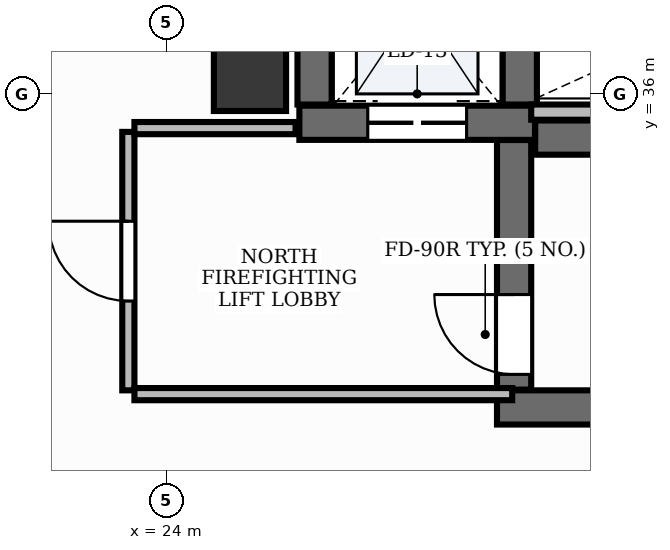
"""IFC4 building model, lengths in metres.
Left out: names, types, materials, properties, quantities, classifications, styles, units other than length and angle.
Written with IfcOpenShell. Run it as: python <this file> out.ifc"""

import sys

from ifc_helpers import new_model, si_unit, direction, frame, frame_2d, origin, origin_2d, place, context, subcontext, project, spatial, rectangle, extrude, element, fill, save


model = new_model("IFC4")
c1 = context("Model", 3, precision=1e-05, world=origin(), true_north=direction((0.0, 1.0)))
c2 = subcontext(c1, "Body", "Model", "MODEL_VIEW")
j1 = project(units=[si_unit("LENGTHUNIT", "METRE"), si_unit("PLANEANGLEUNIT", "RADIAN")], contexts=[c1])
p1 = place(None, origin())
s1 = spatial("IfcSite", under=j1, at=p1, CompositionType="ELEMENT")
p2 = place(p1, origin())
s2 = spatial("IfcBuilding", under=s1, at=p2, CompositionType="ELEMENT")
p3 = place(p2, frame((0.0, 0.0, 76.2)))
s3 = spatial("IfcBuildingStorey", under=s2, at=p3, CompositionType="ELEMENT", Elevation=76.2)
p4 = place(p3, frame((28.852, 35.425, 0.0), z_axis=(0.0, 0.0, 1.0), x_axis=(1.0, 0.0, 0.0)))
e1 = element("IfcWall", 1, at=p4, inside=s3, PredefinedType="SHEAR", context=c2, shape_type="SweptSolid", body=[
    extrude(rectangle(XDim=8.248, YDim=0.45, at=frame_2d((4.124, 0.0))), origin(), (0.0, 0.0, 1.0), 3.9),
])
p5 = place(p3, frame((28.35, 31.875, 0.0), z_axis=(0.0, 0.0, 1.0), x_axis=(1.0, 0.0, 0.0)))
e2 = element("IfcWall", 2, at=p5, inside=s3, PredefinedType="SHEAR", context=c2, shape_type="SweptSolid", body=[
    extrude(rectangle(XDim=8.75, YDim=0.45, at=frame_2d((4.375, 0.0))), origin(), (0.0, 0.0, 1.0), 3.9),
])
p6 = place(p3, frame((28.575, 32.11, 0.0), z_axis=(0.0, 0.0, 1.0), x_axis=(0.0, 1.0, 0.0)))
e3 = element("IfcWall", 3, at=p6, inside=s3, PredefinedType="SHEAR", context=c2, shape_type="SweptSolid", body=[
    extrude(rectangle(XDim=3.283, YDim=0.45, at=frame_2d((1.642, 0.0))), origin(), (0.0, 0.0, 1.0), 3.9),
])
p7 = place(p6, frame((0.2, 0.0, 0.0)))
e4 = element("IfcOpeningElement", 4, at=p7, cuts=e3, PredefinedType="OPENING", context=c2, shape_type="SweptSolid", body=[
    extrude(rectangle(XDim=1.05, YDim=2.15, at=frame_2d((0.525, 1.075))), frame((0.0, 0.24, 0.0), z_axis=(0.0, -1.0, 0.0), x_axis=(1.0, 0.0, 0.0)), (0.0, 0.0, 1.0), 0.48),
])
p8 = place(p3, frame((25.75, 35.62, 0.0), z_axis=(0.0, 0.0, 1.0), x_axis=(1.0, 0.0, 0.0)))
e5 = element("IfcWall", 5, at=p8, inside=s3, PredefinedType="SHEAR", context=c2, shape_type="SweptSolid", body=[
    extrude(rectangle(XDim=3.1, YDim=0.45, at=frame_2d((1.55, 0.0))), origin(), (0.0, 0.0, 1.0), 3.9),
])
p9 = place(p8, frame((0.9, 0.0, 0.0)))
e6 = element("IfcOpeningElement", 6, at=p9, cuts=e5, PredefinedType="OPENING", context=c2, shape_type="SweptSolid", body=[
    extrude(rectangle(XDim=1.3, YDim=2.2, at=frame_2d((0.65, 1.1))), frame((0.0, 0.24, 0.0), z_axis=(0.0, -1.0, 0.0), x_axis=(1.0, 0.0, 0.0)), (0.0, 0.0, 1.0), 0.48),
])
for number, where, z_axis, x_axis in (
    (7, (25.95, 35.86, 0.0), (0.0, 0.0, 1.0), (0.0, 1.0, 0.0)),
    (8, (28.65, 35.86, 0.0), (0.0, 0.0, 1.0), (0.0, 1.0, 0.0)),
):
    element("IfcWall", number, at=place(p3, frame(where, z_axis=z_axis, x_axis=x_axis)), inside=s3, PredefinedType="SHEAR", context=c2, shape_type="SweptSolid", body=[
        extrude(rectangle(XDim=2.7, YDim=0.45, at=frame_2d((1.35, 0.0))), origin(), (0.0, 0.0, 1.0), 3.9),
    ])
p10 = place(p3, frame((25.1, 36.25, -0.0), z_axis=(0.0, 0.0, 1.0), x_axis=(1.0, 0.0, 0.0)))
e9 = element("IfcColumn", 9, at=p10, inside=s3, PredefinedType="PILASTER", context=c2, shape_type="SweptSolid", body=[
    extrude(rectangle(XDim=0.95, YDim=0.95, at=origin_2d()), origin(), (0.0, 0.0, 1.0), 3.901),
])
p11 = place(p3, frame((28.8, 35.76, 0.0), z_axis=(0.0, 0.0, 1.0), x_axis=(1.0, 0.0, 0.0)))
e10 = element("IfcWall", 10, at=p11, inside=s3, PredefinedType="PARTITIONING", context=c2, shape_type="SweptSolid", body=[
    extrude(rectangle(XDim=4.57, YDim=0.2, at=frame_2d((2.285, 0.0))), origin(), (0.0, 0.0, 1.0), 2.91),
])
p12 = place(p3, frame((23.5, 32.1, 0.0), z_axis=(0.0, 0.0, 1.0), x_axis=(0.0, 1.0, 0.0)))
e11 = element("IfcWall", 11, at=p12, inside=s3, PredefinedType="PARTITIONING", context=c2, shape_type="SweptSolid", body=[
    extrude(rectangle(XDim=3.4, YDim=0.16, at=frame_2d((1.7, 0.0))), origin(), (0.0, 0.0, 1.0), 2.91),
])
p13 = place(p12, frame((1.175, 0.0, 0.0)))
e12 = element("IfcOpeningElement", 12, at=p13, cuts=e11, PredefinedType="OPENING", context=c2, shape_type="SweptSolid", body=[
    extrude(rectangle(XDim=1.05, YDim=2.15, at=frame_2d((0.525, 1.075))), frame((0.0, 0.095, 0.0), z_axis=(0.0, -1.0, 0.0), x_axis=(1.0, 0.0, 0.0)), (0.0, 0.0, 1.0), 0.19),
])
p14 = place(p3, frame((23.58, 32.05, 0.0), z_axis=(0.0, 0.0, 1.0), x_axis=(1.0, 0.0, 0.0)))
e13 = element("IfcWall", 13, at=p14, inside=s3, PredefinedType="PARTITIONING", context=c2, shape_type="SweptSolid", body=[
    extrude(rectangle(XDim=4.97, YDim=0.16, at=frame_2d((2.485, 0.0))), origin(), (0.0, 0.0, 1.0), 2.91),
])
p15 = place(p3, frame((23.58, 35.55, 0.0), z_axis=(0.0, 0.0, 1.0), x_axis=(1.0, 0.0, 0.0)))
e14 = element("IfcWall", 14, at=p15, inside=s3, PredefinedType="PARTITIONING", context=c2, shape_type="SweptSolid", body=[
    extrude(rectangle(XDim=2.12, YDim=0.16, at=frame_2d((1.06, 0.0))), origin(), (0.0, 0.0, 1.0), 2.91),
])
p16 = place(p7, origin())
e15 = element("IfcDoor", 15, at=p16, inside=s3, OperationType="SINGLE_SWING_RIGHT", PredefinedType="DOOR", context=c2, shape_type="SweptSolid", body=[
    extrude(rectangle(XDim=1.05, YDim=2.15, at=frame_2d((0.525, 1.075))), frame((0.0, 0.025, 0.0), z_axis=(0.0, -1.0, 0.0), x_axis=(1.0, 0.0, 0.0)), (0.0, 0.0, 1.0), 0.05),
])
fill(e4, e15)
p17 = place(p9, origin())
e16 = element("IfcDoor", 16, at=p17, inside=s3, OperationType="DOUBLE_DOOR_SLIDING", PredefinedType="DOOR", context=c2, shape_type="SweptSolid", body=[
    extrude(rectangle(XDim=1.3, YDim=2.2, at=frame_2d((0.65, 1.1))), frame((0.0, 0.025, 0.0), z_axis=(0.0, -1.0, 0.0), x_axis=(1.0, 0.0, 0.0)), (0.0, 0.0, 1.0), 0.05),
])
fill(e6, e16)
p18 = place(p13, origin())
e17 = element("IfcDoor", 17, at=p18, inside=s3, OperationType="SINGLE_SWING_RIGHT", PredefinedType="DOOR", context=c2, shape_type="SweptSolid", body=[
    extrude(rectangle(XDim=1.05, YDim=2.15, at=frame_2d((0.525, 1.075))), frame((0.0, 0.025, 0.0), z_axis=(0.0, -1.0, 0.0), x_axis=(1.0, 0.0, 0.0)), (0.0, 0.0, 1.0), 0.05),
])
fill(e12, e17)
save(model, sys.argv[1])
